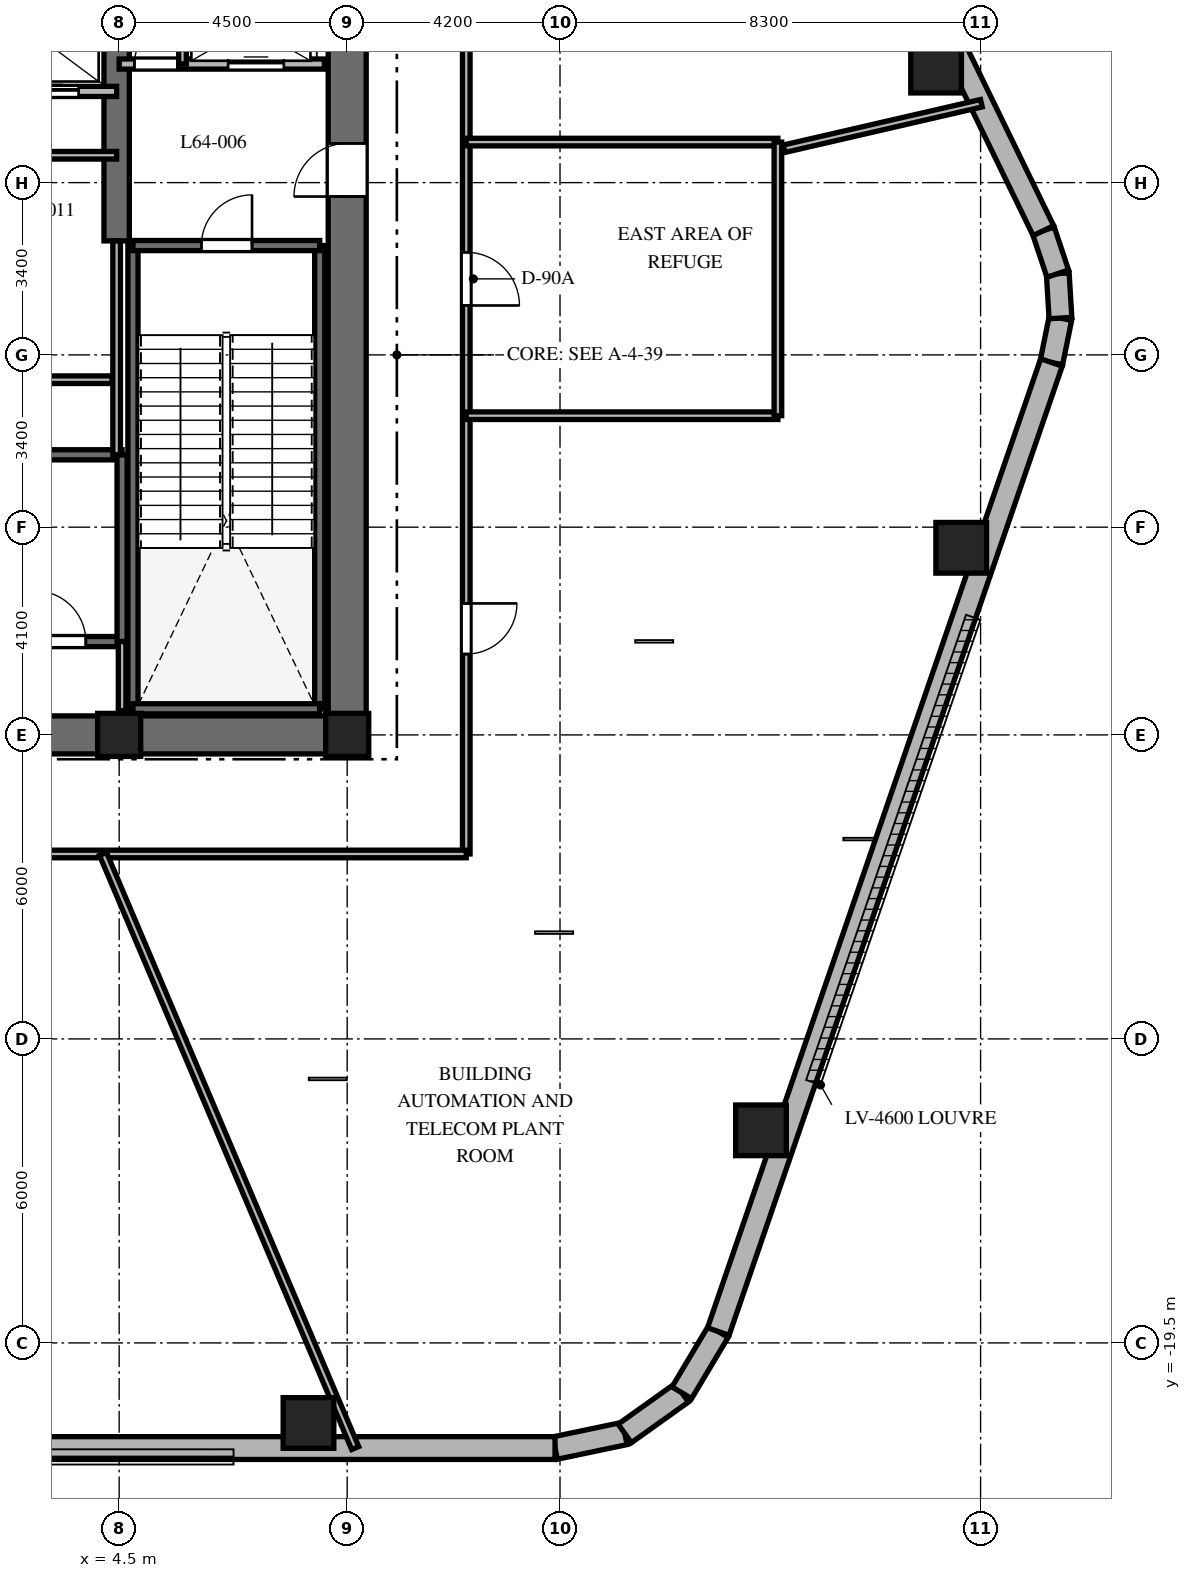
"""IFC4 building model, lengths in metres.
Left out: names, types, materials, properties, quantities, classifications, styles, units other than length and angle.
Written with IfcOpenShell. Run it as: python <this file> out.ifc"""

import sys

from ifc_helpers import new_model, si_unit, direction, frame, frame_2d, origin, origin_2d, place, context, subcontext, project, spatial, rectangle, extrude, element, fill, save


model = new_model("IFC4")
c1 = context("Model", 3, precision=1e-05, world=origin(), true_north=direction((0.0, 1.0)))
c2 = subcontext(c1, "Body", "Model", "MODEL_VIEW")
j1 = project(units=[si_unit("LENGTHUNIT", "METRE"), si_unit("PLANEANGLEUNIT", "RADIAN")], contexts=[c1])
p1 = place(None, origin())
s1 = spatial("IfcSite", under=j1, at=p1, CompositionType="ELEMENT")
p2 = place(p1, origin())
s2 = spatial("IfcBuilding", under=s1, at=p2, CompositionType="ELEMENT")
p3 = place(p2, frame((0.0, 0.0, 255.9)))
s3 = spatial("IfcBuildingStorey", under=s2, at=p3, CompositionType="ELEMENT", Elevation=255.9)
p4 = place(p3, frame((-9.375, -7.5, 0.0), z_axis=(0.0, 0.0, 1.0), x_axis=(1.0, 0.0, 0.0)))
e1 = element("IfcWall", 1, at=p4, inside=s3, PredefinedType="SHEAR", context=c2, shape_type="SweptSolid", body=[
    extrude(rectangle(XDim=18.75, YDim=0.75, at=frame_2d((9.375, 0.0))), origin(), (0.0, 0.0, 1.0), 5.4),
])
p5 = place(p4, frame((9.425, 0.0, 0.0)))
e2 = element("IfcOpeningElement", 2, at=p5, cuts=e1, PredefinedType="OPENING", context=c2, shape_type="SweptSolid", body=[
    extrude(rectangle(XDim=1.0, YDim=2.15, at=frame_2d((0.5, 1.075))), frame((0.0, 0.385, 0.0), z_axis=(0.0, -1.0, 0.0), x_axis=(1.0, 0.0, 0.0)), (0.0, 0.0, 1.0), 0.77),
])
p6 = place(p3, frame((9.0, -7.125, 0.0), z_axis=(0.0, 0.0, 1.0), x_axis=(0.0, 1.0, 0.0)))
e3 = element("IfcWall", 3, at=p6, inside=s3, PredefinedType="SHEAR", context=c2, shape_type="SweptSolid", body=[
    extrude(rectangle(XDim=14.25, YDim=0.75, at=frame_2d((7.125, 0.0))), origin(), (0.0, 0.0, 1.0), 5.4),
])
p7 = place(p6, frame((10.25, 0.0, 0.0)))
e4 = element("IfcOpeningElement", 4, at=p7, cuts=e3, PredefinedType="OPENING", context=c2, shape_type="SweptSolid", body=[
    extrude(rectangle(XDim=1.05, YDim=2.15, at=frame_2d((0.525, 1.075))), frame((0.0, 0.385, 0.0), z_axis=(0.0, -1.0, 0.0), x_axis=(1.0, 0.0, 0.0)), (0.0, 0.0, 1.0), 0.77),
])
p8 = place(p3, frame((4.45, 2.25, 0.0), z_axis=(0.0, 0.0, 1.0), x_axis=(0.0, 1.0, 0.0)))
e5 = element("IfcWall", 5, at=p8, inside=s3, PredefinedType="SHEAR", context=c2, shape_type="SweptSolid", body=[
    extrude(rectangle(XDim=4.875, YDim=0.5, at=frame_2d((2.438, 0.0))), origin(), (0.0, 0.0, 1.0), 5.4),
])
for number, where, z_axis, x_axis in (
    (6, (4.772, -6.985, 0.0), (0.0, 0.0, 1.0), (0.0, 1.0, 0.0)),
    (7, (8.458, -6.985, 0.0), (0.0, 0.0, 1.0), (0.0, 1.0, 0.0)),
):
    element("IfcWall", number, at=place(p3, frame(where, z_axis=z_axis, x_axis=x_axis)), inside=s3, PredefinedType="SHEAR", context=c2, shape_type="SweptSolid", body=[
        extrude(rectangle(XDim=9.143, YDim=0.2, at=frame_2d((4.572, 0.0))), origin(), (0.0, 0.0, 1.0), 5.4),
    ])
p9 = place(p3, frame((4.772, -6.985, 0.0), z_axis=(0.0, 0.0, 1.0), x_axis=(1.0, 0.0, 0.0)))
e8 = element("IfcWall", 8, at=p9, inside=s3, PredefinedType="SHEAR", context=c2, shape_type="SweptSolid", body=[
    extrude(rectangle(XDim=3.686, YDim=0.2, at=frame_2d((1.843, 0.0))), origin(), (0.0, 0.0, 1.0), 5.4),
])
p10 = place(p3, frame((4.772, 2.158, 0.0), z_axis=(0.0, 0.0, 1.0), x_axis=(1.0, 0.0, 0.0)))
e9 = element("IfcWall", 9, at=p10, inside=s3, PredefinedType="SHEAR", context=c2, shape_type="SweptSolid", body=[
    extrude(rectangle(XDim=3.686, YDim=0.2, at=frame_2d((1.843, 0.0))), origin(), (0.0, 0.0, 1.0), 5.4),
])
p11 = place(p10, frame((1.35, 0.0, 0.0)))
e10 = element("IfcOpeningElement", 10, at=p11, cuts=e9, PredefinedType="OPENING", context=c2, shape_type="SweptSolid", body=[
    extrude(rectangle(XDim=1.0, YDim=2.15, at=frame_2d((0.5, 1.075))), frame((0.0, 0.11, 0.0), z_axis=(0.0, -1.0, 0.0), x_axis=(1.0, 0.0, 0.0)), (0.0, 0.0, 1.0), 0.22),
])
p12 = place(p3, frame((-4.608, -5.658, 0.0), z_axis=(0.0, 0.0, 1.0), x_axis=(1.0, 0.0, 0.0)))
e11 = element("IfcWall", 11, at=p12, inside=s3, PredefinedType="SHEAR", context=c2, shape_type="SweptSolid", body=[
    extrude(rectangle(XDim=9.166, YDim=0.2, at=frame_2d((4.583, 0.0))), origin(), (0.0, 0.0, 1.0), 5.4),
])
p13 = place(p12, frame((7.45, 0.0, 0.0)))
e12 = element("IfcOpeningElement", 12, at=p13, cuts=e11, PredefinedType="OPENING", context=c2, shape_type="SweptSolid", body=[
    extrude(rectangle(XDim=1.0, YDim=2.15, at=frame_2d((0.5, 1.075))), frame((0.0, 0.11, 0.0), z_axis=(0.0, -1.0, 0.0), x_axis=(1.0, 0.0, 0.0)), (0.0, 0.0, 1.0), 0.22),
])
p14 = place(p3, frame((-4.608, -1.972, 0.0), z_axis=(0.0, 0.0, 1.0), x_axis=(1.0, 0.0, 0.0)))
e13 = element("IfcWall", 13, at=p14, inside=s3, PredefinedType="SHEAR", context=c2, shape_type="SweptSolid", body=[
    extrude(rectangle(XDim=9.166, YDim=0.2, at=frame_2d((4.583, 0.0))), origin(), (0.0, 0.0, 1.0), 5.4),
])
p15 = place(p3, frame((4.558, -5.658, 0.0), z_axis=(0.0, 0.0, 1.0), x_axis=(0.0, 1.0, 0.0)))
e14 = element("IfcWall", 14, at=p15, inside=s3, PredefinedType="SHEAR", context=c2, shape_type="SweptSolid", body=[
    extrude(rectangle(XDim=3.686, YDim=0.2, at=frame_2d((1.843, 0.0))), origin(), (0.0, 0.0, 1.0), 5.4),
])
for number, where, z_axis, x_axis in (
    (15, (4.5, -7.5, 0.0), (0.0, 0.0, 1.0), (1.0, 0.0, 0.0)),
    (16, (9.0, -7.5, 0.0), (0.0, 0.0, 1.0), (1.0, 0.0, 0.0)),
):
    element("IfcColumn", number, at=place(p3, frame(where, z_axis=z_axis, x_axis=x_axis)), inside=s3, PredefinedType="COLUMN", context=c2, shape_type="SweptSolid", body=[
        extrude(rectangle(XDim=0.85, YDim=0.85, at=origin_2d()), origin(), (0.0, 0.0, 1.0), 5.4),
    ])
for number, where, z_axis, x_axis in (
    (17, (8.236, -21.08, 0.0), (0.0, 0.0, 1.0), (1.0, 0.0, 0.0)),
    (18, (17.166, -15.304, 0.0), (0.0, 0.0, 1.0), (1.0, 0.0, 0.0)),
    (19, (21.118, -3.807, 0.0), (0.0, 0.0, 1.0), (1.0, 0.0, 0.0)),
    (20, (20.622, 5.67, 0.0), (0.0, 0.0, 1.0), (1.0, 0.0, 0.0)),
):
    element("IfcColumn", number, at=place(p3, frame(where, z_axis=z_axis, x_axis=x_axis)), inside=s3, PredefinedType="COLUMN", context=c2, shape_type="SweptSolid", body=[
        extrude(rectangle(XDim=1.0, YDim=1.0, at=origin_2d()), origin(), (0.0, 0.0, 1.0), 5.4),
    ])
p16 = place(p3, frame((13.102, -21.575, 0.0), z_axis=(0.0, 0.0, 1.0), x_axis=(0.978757421505, 0.205021730188, 0.0)))
e21 = element("IfcWall", 21, at=p16, inside=s3, PredefinedType="SOLIDWALL", context=c2, shape_type="SweptSolid", body=[
    extrude(rectangle(XDim=1.406, YDim=0.45, at=frame_2d((0.703, 0.0))), origin(), (0.0, 0.0, 1.0), 5.1),
])
p17 = place(p3, frame((14.478, -21.287, 0.0), z_axis=(0.0, 0.0, 1.0), x_axis=(0.813888518617, 0.58102106611, 0.0)))
e22 = element("IfcWall", 22, at=p17, inside=s3, PredefinedType="SOLIDWALL", context=c2, shape_type="SweptSolid", body=[
    extrude(rectangle(XDim=1.383, YDim=0.45, at=frame_2d((0.691, 0.0))), origin(), (0.0, 0.0, 1.0), 5.1),
])
p18 = place(p3, frame((15.604, -20.483, 0.0), z_axis=(0.0, 0.0, 1.0), x_axis=(0.512222149036, 0.858852996756, 0.0)))
e23 = element("IfcWall", 23, at=p18, inside=s3, PredefinedType="SOLIDWALL", context=c2, shape_type="SweptSolid", body=[
    extrude(rectangle(XDim=1.406, YDim=0.45, at=frame_2d((0.703, 0.0))), origin(), (0.0, 0.0, 1.0), 5.1),
])
p19 = place(p3, frame((22.898, -0.15, 0.0), z_axis=(0.0, 0.0, 1.0), x_axis=(0.199055826889, 0.979988151858, 0.0)))
e24 = element("IfcWall", 24, at=p19, inside=s3, PredefinedType="SOLIDWALL", context=c2, shape_type="SweptSolid", body=[
    extrude(rectangle(XDim=0.894, YDim=0.45, at=frame_2d((0.447, 0.0))), origin(), (0.0, 0.0, 1.0), 5.1),
])
p20 = place(p3, frame((23.076, 0.727, 0.0), z_axis=(0.0, 0.0, 1.0), x_axis=(-0.060805222108, 0.998149650586, 0.0)))
e25 = element("IfcWall", 25, at=p20, inside=s3, PredefinedType="SOLIDWALL", context=c2, shape_type="SweptSolid", body=[
    extrude(rectangle(XDim=0.879, YDim=0.45, at=frame_2d((0.44, 0.0))), origin(), (0.0, 0.0, 1.0), 5.1),
])
p21 = place(p3, frame((23.023, 1.604, 0.0), z_axis=(0.0, 0.0, 1.0), x_axis=(-0.316801227695, 0.948491951537, 0.0)))
e26 = element("IfcWall", 26, at=p21, inside=s3, PredefinedType="SOLIDWALL", context=c2, shape_type="SweptSolid", body=[
    extrude(rectangle(XDim=0.894, YDim=0.45, at=frame_2d((0.447, 0.0))), origin(), (0.0, 0.0, 1.0), 5.1),
])
p22 = place(p3, frame((-11.298, -21.575, 0.0), z_axis=(0.0, 0.0, 1.0), x_axis=(1.0, 0.0, 0.0)))
e27 = element("IfcWall", 27, at=p22, inside=s3, PredefinedType="SOLIDWALL", context=c2, shape_type="SweptSolid", body=[
    extrude(rectangle(XDim=24.399, YDim=0.45, at=frame_2d((12.2, 0.0))), origin(), (0.0, 0.0, 1.0), 5.1),
])
p23 = place(p3, frame((16.324, -19.275, 0.0), z_axis=(0.0, 0.0, 1.0), x_axis=(0.325083142304, 0.945685439557, 0.0)))
e28 = element("IfcWall", 28, at=p23, inside=s3, PredefinedType="SOLIDWALL", context=c2, shape_type="SweptSolid", body=[
    extrude(rectangle(XDim=20.224, YDim=0.45, at=frame_2d((10.112, 0.0))), origin(), (0.0, 0.0, 1.0), 5.1),
])
p24 = place(p3, frame((22.74, 2.452, 0.0), z_axis=(0.0, 0.0, 1.0), x_axis=(-0.437753424814, 0.899095066755, 0.0)))
e29 = element("IfcWall", 29, at=p24, inside=s3, PredefinedType="SOLIDWALL", context=c2, shape_type="SweptSolid", body=[
    extrude(rectangle(XDim=19.137, YDim=0.45, at=frame_2d((9.569, 0.0))), origin(), (0.0, 0.0, 1.0), 5.1),
])
p25 = place(p3, frame((4.558, -7.02, 0.0), z_axis=(0.0, 0.0, 1.0), x_axis=(0.0, 1.0, 0.0)))
e30 = element("IfcWall", 30, at=p25, inside=s3, PredefinedType="PARTITIONING", context=c2, shape_type="SweptSolid", body=[
    extrude(rectangle(XDim=1.362, YDim=0.15, at=frame_2d((0.681, 0.0))), origin(), (0.0, 0.0, 1.0), 5.1),
])
p26 = place(p3, frame((4.5, 5.74, 0.0), z_axis=(0.0, 0.0, 1.0), x_axis=(1.0, 0.0, 0.0)))
e31 = element("IfcWall", 31, at=p26, inside=s3, PredefinedType="PARTITIONING", context=c2, shape_type="SweptSolid", body=[
    extrude(rectangle(XDim=4.05, YDim=0.2, at=frame_2d((2.025, 0.0))), origin(), (0.0, 0.0, 1.0), 5.1),
])
p27 = place(p26, frame((0.3, 0.0, 0.0)))
e32 = element("IfcOpeningElement", 32, at=p27, cuts=e31, PredefinedType="OPENING", context=c2, shape_type="SweptSolid", body=[
    extrude(rectangle(XDim=0.85, YDim=2.03, at=frame_2d((0.425, 1.015))), frame((0.0, 0.11, 0.0), z_axis=(0.0, -1.0, 0.0), x_axis=(1.0, 0.0, 0.0)), (0.0, 0.0, 1.0), 0.22),
])
p28 = place(p26, frame((2.15, 0.0, 0.0)))
e33 = element("IfcOpeningElement", 33, at=p28, cuts=e31, PredefinedType="OPENING", context=c2, shape_type="SweptSolid", body=[
    extrude(rectangle(XDim=1.1, YDim=2.2, at=frame_2d((0.55, 1.1))), frame((0.0, 0.11, 0.0), z_axis=(0.0, -1.0, 0.0), x_axis=(1.0, 0.0, 0.0)), (0.0, 0.0, 1.0), 0.22),
])
p29 = place(p3, frame((5.75, 5.74, 0.0), z_axis=(0.0, 0.0, 1.0), x_axis=(0.0, 1.0, 0.0)))
e34 = element("IfcWall", 34, at=p29, inside=s3, PredefinedType="PARTITIONING", context=c2, shape_type="SweptSolid", body=[
    extrude(rectangle(XDim=1.41, YDim=0.15, at=frame_2d((0.705, 0.0))), origin(), (0.0, 0.0, 1.0), 5.1),
])
p30 = place(p3, frame((1.85, 5.2, 0.0), z_axis=(0.0, 0.0, 1.0), x_axis=(1.0, 0.0, 0.0)))
e35 = element("IfcWall", 35, at=p30, inside=s3, PredefinedType="PARTITIONING", context=c2, shape_type="SweptSolid", body=[
    extrude(rectangle(XDim=2.6, YDim=0.2, at=frame_2d((1.3, 0.0))), origin(), (0.0, 0.0, 1.0), 5.1),
])
p31 = place(p30, frame((0.75, 0.0, 0.0)))
e36 = element("IfcOpeningElement", 36, at=p31, cuts=e35, PredefinedType="OPENING", context=c2, shape_type="SweptSolid", body=[
    extrude(rectangle(XDim=1.1, YDim=2.2, at=frame_2d((0.55, 1.1))), frame((0.0, 0.11, 0.0), z_axis=(0.0, -1.0, 0.0), x_axis=(1.0, 0.0, 0.0)), (0.0, 0.0, 1.0), 0.22),
])
p32 = place(p3, frame((4.45, -1.972, 0.0), z_axis=(0.0, 0.0, 1.0), x_axis=(0.0, 1.0, 0.0)))
e37 = element("IfcWall", 37, at=p32, inside=s3, PredefinedType="PARTITIONING", context=c2, shape_type="SweptSolid", body=[
    extrude(rectangle(XDim=4.222, YDim=0.15, at=frame_2d((2.111, 0.0))), origin(), (0.0, 0.0, 1.0), 5.1),
])
p33 = place(p3, frame((1.9, 3.94, 0.0), z_axis=(0.0, 0.0, 1.0), x_axis=(1.0, 0.0, 0.0)))
e38 = element("IfcWall", 38, at=p33, inside=s3, PredefinedType="PARTITIONING", context=c2, shape_type="SweptSolid", body=[
    extrude(rectangle(XDim=2.55, YDim=0.15, at=frame_2d((1.275, 0.0))), origin(), (0.0, 0.0, 1.0), 5.1),
])
p34 = place(p3, frame((-4.36, -0.49, 0.0), z_axis=(0.0, 0.0, 1.0), x_axis=(1.0, 0.0, 0.0)))
e39 = element("IfcWall", 39, at=p34, inside=s3, PredefinedType="PARTITIONING", context=c2, shape_type="SweptSolid", body=[
    extrude(rectangle(XDim=8.72, YDim=0.15, at=frame_2d((4.36, 0.0))), origin(), (0.0, 0.0, 1.0), 5.1),
])
p35 = place(p34, frame((2.81, 0.0, 0.0)))
e40 = element("IfcOpeningElement", 40, at=p35, cuts=e39, PredefinedType="OPENING", context=c2, shape_type="SweptSolid", body=[
    extrude(rectangle(XDim=0.85, YDim=2.03, at=frame_2d((0.425, 1.015))), frame((0.0, 0.085, 0.0), z_axis=(0.0, -1.0, 0.0), x_axis=(1.0, 0.0, 0.0)), (0.0, 0.0, 1.0), 0.17),
])
p36 = place(p34, frame((4.61, 0.0, 0.0)))
e41 = element("IfcOpeningElement", 41, at=p36, cuts=e39, PredefinedType="OPENING", context=c2, shape_type="SweptSolid", body=[
    extrude(rectangle(XDim=0.85, YDim=2.03, at=frame_2d((0.425, 1.015))), frame((0.0, 0.085, 0.0), z_axis=(0.0, -1.0, 0.0), x_axis=(1.0, 0.0, 0.0)), (0.0, 0.0, 1.0), 0.17),
])
p37 = place(p3, frame((11.35, 9.85, 0.0), z_axis=(0.0, 0.0, 1.0), x_axis=(0.0, -1.0, 0.0)))
e42 = element("IfcWall", 42, at=p37, inside=s3, PredefinedType="PARTITIONING", context=c2, shape_type="SweptSolid", body=[
    extrude(rectangle(XDim=19.7, YDim=0.15, at=frame_2d((9.85, 0.0))), origin(), (0.0, 0.0, 1.0), 3.29),
])
p38 = place(p37, frame((7.825, 0.0, 0.0)))
e43 = element("IfcOpeningElement", 43, at=p38, cuts=e42, PredefinedType="OPENING", context=c2, shape_type="SweptSolid", body=[
    extrude(rectangle(XDim=1.05, YDim=2.15, at=frame_2d((0.525, 1.075))), frame((0.0, 0.085, 0.0), z_axis=(0.0, -1.0, 0.0), x_axis=(1.0, 0.0, 0.0)), (0.0, 0.0, 1.0), 0.17),
])
p39 = place(p37, frame((14.755, 0.0, 0.0)))
e44 = element("IfcOpeningElement", 44, at=p39, cuts=e42, PredefinedType="OPENING", context=c2, shape_type="SweptSolid", body=[
    extrude(rectangle(XDim=1.0, YDim=2.15, at=frame_2d((0.5, 1.075))), frame((0.0, 0.085, 0.0), z_axis=(0.0, -1.0, 0.0), x_axis=(1.0, 0.0, 0.0)), (0.0, 0.0, 1.0), 0.17),
])
p40 = place(p3, frame((11.35, -9.85, 0.0), z_axis=(0.0, 0.0, 1.0), x_axis=(-1.0, 0.0, 0.0)))
e45 = element("IfcWall", 45, at=p40, inside=s3, PredefinedType="PARTITIONING", context=c2, shape_type="SweptSolid", body=[
    extrude(rectangle(XDim=22.7, YDim=0.15, at=frame_2d((11.35, 0.0))), origin(), (0.0, 0.0, 1.0), 3.29),
])
p41 = place(p40, frame((14.086, 0.0, 0.0)))
e46 = element("IfcOpeningElement", 46, at=p41, cuts=e45, PredefinedType="OPENING", context=c2, shape_type="SweptSolid", body=[
    extrude(rectangle(XDim=1.0, YDim=2.15, at=frame_2d((0.5, 1.075))), frame((0.0, 0.085, 0.0), z_axis=(0.0, -1.0, 0.0), x_axis=(1.0, 0.0, 0.0)), (0.0, 0.0, 1.0), 0.17),
])
for number, where, z_axis, x_axis in (
    (47, (11.35, -1.2, 0.0), (0.0, 0.0, 1.0), (1.0, 0.0, 0.0)),
    (48, (11.35, 4.2, 0.0), (0.0, 0.0, 1.0), (1.0, 0.0, 0.0)),
):
    element("IfcWall", number, at=place(p3, frame(where, z_axis=z_axis, x_axis=x_axis)), inside=s3, PredefinedType="PARTITIONING", context=c2, shape_type="SweptSolid", body=[
        extrude(rectangle(XDim=6.15, YDim=0.15, at=frame_2d((3.075, 0.0))), origin(), (0.0, 0.0, 1.0), 4.541),
    ])
p42 = place(p3, frame((17.5, -1.2, 0.0), z_axis=(0.0, 0.0, 1.0), x_axis=(0.0, 1.0, 0.0)))
e49 = element("IfcWall", 49, at=p42, inside=s3, PredefinedType="PARTITIONING", context=c2, shape_type="SweptSolid", body=[
    extrude(rectangle(XDim=5.4, YDim=0.15, at=frame_2d((2.7, 0.0))), origin(), (0.0, 0.0, 1.0), 5.1),
])
p43 = place(p3, frame((17.623, 4.069, 0.0), z_axis=(0.0, 0.0, 1.0), x_axis=(0.974369561662, 0.224953233598, 0.0)))
e50 = element("IfcWall", 50, at=p43, inside=s3, PredefinedType="PARTITIONING", context=c2, shape_type="SweptSolid", body=[
    extrude(rectangle(XDim=3.995, YDim=0.15, at=frame_2d((1.998, 0.0))), origin(), (0.0, 0.0, 1.0), 3.29),
])
p44 = place(p3, frame((4.181, -9.85, 0.0), z_axis=(0.0, 0.0, 1.0), x_axis=(0.390724582578, -0.920507631999, 0.0)))
e51 = element("IfcWall", 51, at=p44, inside=s3, PredefinedType="PARTITIONING", context=c2, shape_type="SweptSolid", body=[
    extrude(rectangle(XDim=12.737, YDim=0.15, at=frame_2d((6.369, 0.0))), origin(), (0.0, 0.0, 1.0), 3.29),
])
p45 = place(p11, origin())
e52 = element("IfcDoor", 52, at=p45, inside=s3, OperationType="SINGLE_SWING_RIGHT", PredefinedType="DOOR", context=c2, shape_type="SweptSolid", body=[
    extrude(rectangle(XDim=1.0, YDim=2.15, at=frame_2d((0.5, 1.075))), frame((0.0, 0.025, 0.0), z_axis=(0.0, -1.0, 0.0), x_axis=(1.0, 0.0, 0.0)), (0.0, 0.0, 1.0), 0.05),
])
fill(e10, e52)
p46 = place(p13, origin())
e53 = element("IfcDoor", 53, at=p46, inside=s3, OperationType="SINGLE_SWING_LEFT", PredefinedType="DOOR", context=c2, shape_type="SweptSolid", body=[
    extrude(rectangle(XDim=1.0, YDim=2.15, at=frame_2d((0.5, 1.075))), frame((0.0, 0.025, 0.0), z_axis=(0.0, -1.0, 0.0), x_axis=(1.0, 0.0, 0.0)), (0.0, 0.0, 1.0), 0.05),
])
fill(e12, e53)
p47 = place(p7, origin())
e54 = element("IfcDoor", 54, at=p47, inside=s3, OperationType="SINGLE_SWING_LEFT", PredefinedType="DOOR", context=c2, shape_type="SweptSolid", body=[
    extrude(rectangle(XDim=1.05, YDim=2.15, at=frame_2d((0.525, 1.075))), frame((0.0, 0.025, 0.0), z_axis=(0.0, -1.0, 0.0), x_axis=(1.0, 0.0, 0.0)), (0.0, 0.0, 1.0), 0.05),
])
fill(e4, e54)
p48 = place(p27, origin())
e55 = element("IfcDoor", 55, at=p48, inside=s3, OperationType="SINGLE_SWING_RIGHT", PredefinedType="DOOR", context=c2, shape_type="SweptSolid", body=[
    extrude(rectangle(XDim=0.85, YDim=2.03, at=frame_2d((0.425, 1.015))), frame((0.0, 0.025, 0.0), z_axis=(0.0, -1.0, 0.0), x_axis=(1.0, 0.0, 0.0)), (0.0, 0.0, 1.0), 0.05),
])
fill(e32, e55)
p49 = place(p28, origin())
e56 = element("IfcDoor", 56, at=p49, inside=s3, OperationType="SLIDING_TO_RIGHT", PredefinedType="DOOR", context=c2, shape_type="SweptSolid", body=[
    extrude(rectangle(XDim=1.1, YDim=2.2, at=frame_2d((0.55, 1.1))), frame((0.0, 0.025, 0.0), z_axis=(0.0, -1.0, 0.0), x_axis=(1.0, 0.0, 0.0)), (0.0, 0.0, 1.0), 0.05),
])
fill(e33, e56)
p50 = place(p31, origin())
e57 = element("IfcDoor", 57, at=p50, inside=s3, OperationType="SLIDING_TO_RIGHT", PredefinedType="DOOR", context=c2, shape_type="SweptSolid", body=[
    extrude(rectangle(XDim=1.1, YDim=2.2, at=frame_2d((0.55, 1.1))), frame((0.0, 0.025, 0.0), z_axis=(0.0, -1.0, 0.0), x_axis=(1.0, 0.0, 0.0)), (0.0, 0.0, 1.0), 0.05),
])
fill(e36, e57)
p51 = place(p38, origin())
e58 = element("IfcDoor", 58, at=p51, inside=s3, OperationType="SINGLE_SWING_RIGHT", PredefinedType="DOOR", context=c2, shape_type="SweptSolid", body=[
    extrude(rectangle(XDim=1.05, YDim=2.15, at=frame_2d((0.525, 1.075))), frame((0.0, 0.025, 0.0), z_axis=(0.0, -1.0, 0.0), x_axis=(1.0, 0.0, 0.0)), (0.0, 0.0, 1.0), 0.05),
])
fill(e43, e58)
p52 = place(p39, origin())
e59 = element("IfcDoor", 59, at=p52, inside=s3, OperationType="SINGLE_SWING_LEFT", PredefinedType="DOOR", context=c2, shape_type="SweptSolid", body=[
    extrude(rectangle(XDim=1.0, YDim=2.15, at=frame_2d((0.5, 1.075))), frame((0.0, 0.025, 0.0), z_axis=(0.0, -1.0, 0.0), x_axis=(1.0, 0.0, 0.0)), (0.0, 0.0, 1.0), 0.05),
])
fill(e44, e59)
save(model, sys.argv[1])
